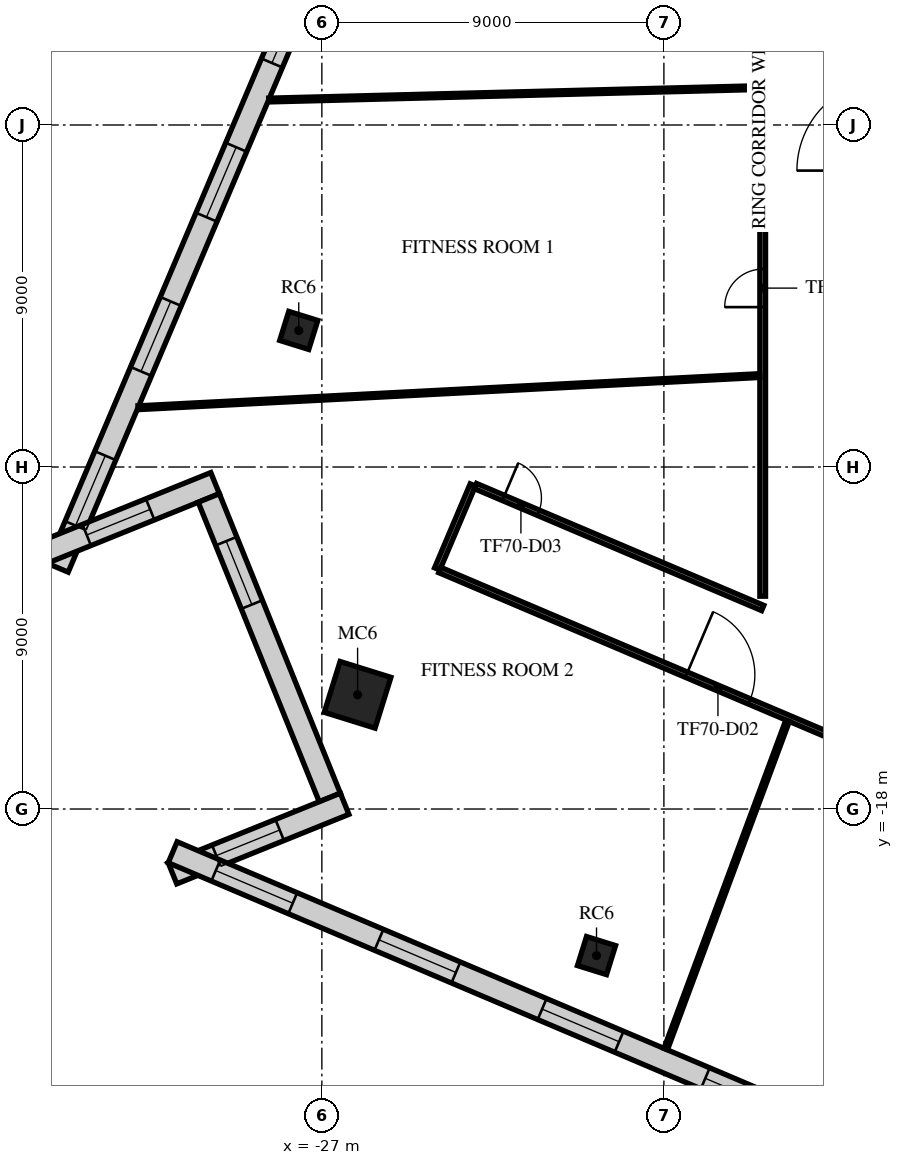
"""IFC4 building model, lengths in metres.
Left out: names, types, materials, properties, quantities, classifications, styles, units other than length and angle.
Written with IfcOpenShell. Run it as: python <this file> out.ifc"""

import sys

from ifc_helpers import new_model, si_unit, direction, frame, frame_2d, origin, origin_2d, place, context, subcontext, project, spatial, rectangle, extrude, element, fill, save


model = new_model("IFC4")
c1 = context("Model", 3, precision=1e-05, world=origin(), true_north=direction((0.0, 1.0)))
c2 = subcontext(c1, "Body", "Model", "MODEL_VIEW")
j1 = project(units=[si_unit("LENGTHUNIT", "METRE"), si_unit("PLANEANGLEUNIT", "RADIAN")], contexts=[c1])
p1 = place(None, origin())
s1 = spatial("IfcSite", under=j1, at=p1, CompositionType="ELEMENT")
p2 = place(p1, origin())
s2 = spatial("IfcBuilding", under=s1, at=p2, CompositionType="ELEMENT")
p3 = place(p2, frame((0.0, 0.0, 296.5)))
s3 = spatial("IfcBuildingStorey", under=s2, at=p3, CompositionType="ELEMENT", Elevation=296.5)
p4 = place(p3, frame((-27.608, -5.406, -0.35), z_axis=(0.0, 0.0, 1.0), x_axis=(0.297503182032, 0.954720826567, 0.0)))
e1 = element("IfcColumn", 1, at=p4, inside=s3, PredefinedType="COLUMN", context=c2, shape_type="SweptSolid", body=[
    extrude(rectangle(XDim=0.8, YDim=0.8, at=origin_2d()), origin(), (0.0, 0.0, 1.0), 4.35),
])
p5 = place(p3, frame((-26.06, -14.995, -0.35), z_axis=(0.0, 0.0, 1.0), x_axis=(0.297503182032, 0.954720826567, 0.0)))
e2 = element("IfcColumn", 2, at=p5, inside=s3, PredefinedType="COLUMN", context=c2, shape_type="SweptSolid", body=[
    extrude(rectangle(XDim=1.4, YDim=1.4, at=origin_2d()), origin(), (0.0, 0.0, 1.0), 4.35),
])
p6 = place(p3, frame((-19.773, -21.857, -0.35), z_axis=(0.0, 0.0, 1.0), x_axis=(0.297503182032, 0.954720826567, 0.0)))
e3 = element("IfcColumn", 3, at=p6, inside=s3, PredefinedType="COLUMN", context=c2, shape_type="SweptSolid", body=[
    extrude(rectangle(XDim=0.8, YDim=0.8, at=origin_2d()), origin(), (0.0, 0.0, 1.0), 4.35),
])
p7 = place(p3, frame((-15.005, 32.985, 0.0), z_axis=(0.0, 0.0, 1.0), x_axis=(-0.39073034436, -0.920505186295, 0.0)))
e4 = element("IfcWall", 4, at=p7, inside=s3, PredefinedType="STANDARD", context=c2, shape_type="SweptSolid", body=[
    extrude(rectangle(XDim=48.49, YDim=0.6, at=frame_2d((24.245, 0.0))), origin(), (0.0, 0.0, 1.0), 3.65),
])
p8 = place(p7, frame((1.204, 0.0, 0.9)))
e5 = element("IfcOpeningElement", 5, at=p8, cuts=e4, PredefinedType="OPENING", context=c2, shape_type="SweptSolid", body=[
    extrude(rectangle(XDim=2.0, YDim=2.1, at=frame_2d((1.0, 1.05))), frame((0.0, 0.31, 0.0), z_axis=(0.0, -1.0, 0.0), x_axis=(1.0, 0.0, 0.0)), (0.0, 0.0, 1.0), 0.62),
])
p9 = place(p7, frame((5.612, 0.0, 0.9)))
e6 = element("IfcOpeningElement", 6, at=p9, cuts=e4, PredefinedType="OPENING", context=c2, shape_type="SweptSolid", body=[
    extrude(rectangle(XDim=2.0, YDim=2.1, at=frame_2d((1.0, 1.05))), frame((0.0, 0.31, 0.0), z_axis=(0.0, -1.0, 0.0), x_axis=(1.0, 0.0, 0.0)), (0.0, 0.0, 1.0), 0.62),
])
p10 = place(p7, frame((10.021, 0.0, 0.9)))
e7 = element("IfcOpeningElement", 7, at=p10, cuts=e4, PredefinedType="OPENING", context=c2, shape_type="SweptSolid", body=[
    extrude(rectangle(XDim=2.0, YDim=2.1, at=frame_2d((1.0, 1.05))), frame((0.0, 0.31, 0.0), z_axis=(0.0, -1.0, 0.0), x_axis=(1.0, 0.0, 0.0)), (0.0, 0.0, 1.0), 0.62),
])
p11 = place(p7, frame((14.428, 0.0, 0.9)))
e8 = element("IfcOpeningElement", 8, at=p11, cuts=e4, PredefinedType="OPENING", context=c2, shape_type="SweptSolid", body=[
    extrude(rectangle(XDim=2.0, YDim=2.1, at=frame_2d((1.0, 1.05))), frame((0.0, 0.31, 0.0), z_axis=(0.0, -1.0, 0.0), x_axis=(1.0, 0.0, 0.0)), (0.0, 0.0, 1.0), 0.62),
])
p12 = place(p7, frame((18.837, 0.0, 0.9)))
e9 = element("IfcOpeningElement", 9, at=p12, cuts=e4, PredefinedType="OPENING", context=c2, shape_type="SweptSolid", body=[
    extrude(rectangle(XDim=2.0, YDim=2.1, at=frame_2d((1.0, 1.05))), frame((0.0, 0.31, 0.0), z_axis=(0.0, -1.0, 0.0), x_axis=(1.0, 0.0, 0.0)), (0.0, 0.0, 1.0), 0.62),
])
p13 = place(p7, frame((23.245, 0.0, 0.9)))
e10 = element("IfcOpeningElement", 10, at=p13, cuts=e4, PredefinedType="OPENING", context=c2, shape_type="SweptSolid", body=[
    extrude(rectangle(XDim=2.0, YDim=2.1, at=frame_2d((1.0, 1.05))), frame((0.0, 0.31, 0.0), z_axis=(0.0, -1.0, 0.0), x_axis=(1.0, 0.0, 0.0)), (0.0, 0.0, 1.0), 0.62),
])
p14 = place(p7, frame((27.653, 0.0, 0.9)))
e11 = element("IfcOpeningElement", 11, at=p14, cuts=e4, PredefinedType="OPENING", context=c2, shape_type="SweptSolid", body=[
    extrude(rectangle(XDim=2.0, YDim=2.1, at=frame_2d((1.0, 1.05))), frame((0.0, 0.31, 0.0), z_axis=(0.0, -1.0, 0.0), x_axis=(1.0, 0.0, 0.0)), (0.0, 0.0, 1.0), 0.62),
])
p15 = place(p7, frame((32.061, 0.0, 0.9)))
e12 = element("IfcOpeningElement", 12, at=p15, cuts=e4, PredefinedType="OPENING", context=c2, shape_type="SweptSolid", body=[
    extrude(rectangle(XDim=2.0, YDim=2.1, at=frame_2d((1.0, 1.05))), frame((0.0, 0.31, 0.0), z_axis=(0.0, -1.0, 0.0), x_axis=(1.0, 0.0, 0.0)), (0.0, 0.0, 1.0), 0.62),
])
p16 = place(p7, frame((36.469, 0.0, 0.9)))
e13 = element("IfcOpeningElement", 13, at=p16, cuts=e4, PredefinedType="OPENING", context=c2, shape_type="SweptSolid", body=[
    extrude(rectangle(XDim=2.0, YDim=2.1, at=frame_2d((1.0, 1.05))), frame((0.0, 0.31, 0.0), z_axis=(0.0, -1.0, 0.0), x_axis=(1.0, 0.0, 0.0)), (0.0, 0.0, 1.0), 0.62),
])
p17 = place(p7, frame((40.877, 0.0, 0.9)))
e14 = element("IfcOpeningElement", 14, at=p17, cuts=e4, PredefinedType="OPENING", context=c2, shape_type="SweptSolid", body=[
    extrude(rectangle(XDim=2.0, YDim=2.1, at=frame_2d((1.0, 1.05))), frame((0.0, 0.31, 0.0), z_axis=(0.0, -1.0, 0.0), x_axis=(1.0, 0.0, 0.0)), (0.0, 0.0, 1.0), 0.62),
])
p18 = place(p7, frame((45.285, 0.0, 0.9)))
e15 = element("IfcOpeningElement", 15, at=p18, cuts=e4, PredefinedType="OPENING", context=c2, shape_type="SweptSolid", body=[
    extrude(rectangle(XDim=2.0, YDim=2.1, at=frame_2d((1.0, 1.05))), frame((0.0, 0.31, 0.0), z_axis=(0.0, -1.0, 0.0), x_axis=(1.0, 0.0, 0.0)), (0.0, 0.0, 1.0), 0.62),
])
p19 = place(p3, frame((-34.34, -11.255, 0.0), z_axis=(0.0, 0.0, 1.0), x_axis=(0.927189106571, 0.374593593988, 0.0)))
e16 = element("IfcWall", 16, at=p19, inside=s3, PredefinedType="STANDARD", context=c2, shape_type="SweptSolid", body=[
    extrude(rectangle(XDim=4.885, YDim=0.6, at=frame_2d((2.443, 0.0))), origin(), (0.0, 0.0, 1.0), 3.65),
])
p20 = place(p19, frame((1.243, 0.0, 0.9)))
e17 = element("IfcOpeningElement", 17, at=p20, cuts=e16, PredefinedType="OPENING", context=c2, shape_type="SweptSolid", body=[
    extrude(rectangle(XDim=1.8, YDim=2.1, at=frame_2d((0.9, 1.05))), frame((0.0, 0.31, 0.0), z_axis=(0.0, -1.0, 0.0), x_axis=(1.0, 0.0, 0.0)), (0.0, 0.0, 1.0), 0.62),
])
p21 = place(p3, frame((-29.976, -9.815, 0.0), z_axis=(0.0, 0.0, 1.0), x_axis=(0.374622134294, -0.927177575493, 0.0)))
e18 = element("IfcWall", 18, at=p21, inside=s3, PredefinedType="STANDARD", context=c2, shape_type="SweptSolid", body=[
    extrude(rectangle(XDim=8.5, YDim=0.6, at=frame_2d((4.25, 0.0))), origin(), (0.0, 0.0, 1.0), 3.65),
])
p22 = place(p21, frame((1.225, 0.0, 0.9)))
e19 = element("IfcOpeningElement", 19, at=p22, cuts=e18, PredefinedType="OPENING", context=c2, shape_type="SweptSolid", body=[
    extrude(rectangle(XDim=1.8, YDim=2.1, at=frame_2d((0.9, 1.05))), frame((0.0, 0.31, 0.0), z_axis=(0.0, -1.0, 0.0), x_axis=(1.0, 0.0, 0.0)), (0.0, 0.0, 1.0), 0.62),
])
p23 = place(p3, frame((-26.401, -17.862, 0.0), z_axis=(0.0, 0.0, 1.0), x_axis=(-0.927189106571, -0.374593593988, 0.0)))
e20 = element("IfcWall", 20, at=p23, inside=s3, PredefinedType="STANDARD", context=c2, shape_type="SweptSolid", body=[
    extrude(rectangle(XDim=4.885, YDim=0.6, at=frame_2d((2.443, 0.0))), origin(), (0.0, 0.0, 1.0), 3.65),
])
p24 = place(p23, frame((1.843, 0.0, 0.9)))
e21 = element("IfcOpeningElement", 21, at=p24, cuts=e20, PredefinedType="OPENING", context=c2, shape_type="SweptSolid", body=[
    extrude(rectangle(XDim=1.8, YDim=2.1, at=frame_2d((0.9, 1.05))), frame((0.0, 0.31, 0.0), z_axis=(0.0, -1.0, 0.0), x_axis=(1.0, 0.0, 0.0)), (0.0, 0.0, 1.0), 0.62),
])
p25 = place(p3, frame((-30.926, -19.138, 0.0), z_axis=(0.0, 0.0, 1.0), x_axis=(0.920504905663, -0.39073100549, 0.0)))
e22 = element("IfcWall", 22, at=p25, inside=s3, PredefinedType="STANDARD", context=c2, shape_type="SweptSolid", body=[
    extrude(rectangle(XDim=41.979, YDim=0.6, at=frame_2d((20.99, 0.0))), origin(), (0.0, 0.0, 1.0), 3.65),
])
p26 = place(p25, frame((1.232, 0.0, 0.9)))
e23 = element("IfcOpeningElement", 23, at=p26, cuts=e22, PredefinedType="OPENING", context=c2, shape_type="SweptSolid", body=[
    extrude(rectangle(XDim=2.2, YDim=2.1, at=frame_2d((1.1, 1.05))), frame((0.0, 0.31, 0.0), z_axis=(0.0, -1.0, 0.0), x_axis=(1.0, 0.0, 0.0)), (0.0, 0.0, 1.0), 0.62),
])
p27 = place(p25, frame((5.896, 0.0, 0.9)))
e24 = element("IfcOpeningElement", 24, at=p27, cuts=e22, PredefinedType="OPENING", context=c2, shape_type="SweptSolid", body=[
    extrude(rectangle(XDim=2.2, YDim=2.1, at=frame_2d((1.1, 1.05))), frame((0.0, 0.31, 0.0), z_axis=(0.0, -1.0, 0.0), x_axis=(1.0, 0.0, 0.0)), (0.0, 0.0, 1.0), 0.62),
])
p28 = place(p25, frame((10.561, 0.0, 0.9)))
e25 = element("IfcOpeningElement", 25, at=p28, cuts=e22, PredefinedType="OPENING", context=c2, shape_type="SweptSolid", body=[
    extrude(rectangle(XDim=2.2, YDim=2.1, at=frame_2d((1.1, 1.05))), frame((0.0, 0.31, 0.0), z_axis=(0.0, -1.0, 0.0), x_axis=(1.0, 0.0, 0.0)), (0.0, 0.0, 1.0), 0.62),
])
p29 = place(p25, frame((15.225, 0.0, 0.9)))
e26 = element("IfcOpeningElement", 26, at=p29, cuts=e22, PredefinedType="OPENING", context=c2, shape_type="SweptSolid", body=[
    extrude(rectangle(XDim=2.2, YDim=2.1, at=frame_2d((1.1, 1.05))), frame((0.0, 0.31, 0.0), z_axis=(0.0, -1.0, 0.0), x_axis=(1.0, 0.0, 0.0)), (0.0, 0.0, 1.0), 0.62),
])
p30 = place(p25, frame((19.89, 0.0, 0.9)))
e27 = element("IfcOpeningElement", 27, at=p30, cuts=e22, PredefinedType="OPENING", context=c2, shape_type="SweptSolid", body=[
    extrude(rectangle(XDim=2.2, YDim=2.1, at=frame_2d((1.1, 1.05))), frame((0.0, 0.31, 0.0), z_axis=(0.0, -1.0, 0.0), x_axis=(1.0, 0.0, 0.0)), (0.0, 0.0, 1.0), 0.62),
])
p31 = place(p25, frame((24.554, 0.0, 0.9)))
e28 = element("IfcOpeningElement", 28, at=p31, cuts=e22, PredefinedType="OPENING", context=c2, shape_type="SweptSolid", body=[
    extrude(rectangle(XDim=2.2, YDim=2.1, at=frame_2d((1.1, 1.05))), frame((0.0, 0.31, 0.0), z_axis=(0.0, -1.0, 0.0), x_axis=(1.0, 0.0, 0.0)), (0.0, 0.0, 1.0), 0.62),
])
p32 = place(p25, frame((29.218, 0.0, 0.9)))
e29 = element("IfcOpeningElement", 29, at=p32, cuts=e22, PredefinedType="OPENING", context=c2, shape_type="SweptSolid", body=[
    extrude(rectangle(XDim=2.2, YDim=2.1, at=frame_2d((1.1, 1.05))), frame((0.0, 0.31, 0.0), z_axis=(0.0, -1.0, 0.0), x_axis=(1.0, 0.0, 0.0)), (0.0, 0.0, 1.0), 0.62),
])
p33 = place(p25, frame((33.883, 0.0, 0.9)))
e30 = element("IfcOpeningElement", 30, at=p33, cuts=e22, PredefinedType="OPENING", context=c2, shape_type="SweptSolid", body=[
    extrude(rectangle(XDim=2.2, YDim=2.1, at=frame_2d((1.1, 1.05))), frame((0.0, 0.31, 0.0), z_axis=(0.0, -1.0, 0.0), x_axis=(1.0, 0.0, 0.0)), (0.0, 0.0, 1.0), 0.62),
])
p34 = place(p25, frame((38.547, 0.0, 0.9)))
e31 = element("IfcOpeningElement", 31, at=p34, cuts=e22, PredefinedType="OPENING", context=c2, shape_type="SweptSolid", body=[
    extrude(rectangle(XDim=2.2, YDim=2.1, at=frame_2d((1.1, 1.05))), frame((0.0, 0.31, 0.0), z_axis=(0.0, -1.0, 0.0), x_axis=(1.0, 0.0, 0.0)), (0.0, 0.0, 1.0), 0.62),
])
p35 = place(p3, frame((-23.965, -11.682, 0.0), z_axis=(0.0, 0.0, 1.0), x_axis=(0.390356552854, 0.920663761448, 0.0)))
e32 = element("IfcWall", 32, at=p35, inside=s3, PredefinedType="PARTITIONING", context=c2, shape_type="SweptSolid", body=[
    extrude(rectangle(XDim=2.4, YDim=0.15, at=frame_2d((1.2, 0.0))), origin(), (0.0, 0.0, 1.0), 3.25),
])
p36 = place(p3, frame((-23.896, -11.711, 0.0), z_axis=(0.0, 0.0, 1.0), x_axis=(0.920507643781, -0.390724554821, 0.0)))
e33 = element("IfcWall", 33, at=p36, inside=s3, PredefinedType="PARTITIONING", context=c2, shape_type="SweptSolid", body=[
    extrude(rectangle(XDim=34.917, YDim=0.15, at=frame_2d((17.458, 0.0))), origin(), (0.0, 0.0, 1.0), 3.25),
])
p37 = place(p36, frame((7.05, 0.0, 0.0)))
e34 = element("IfcOpeningElement", 34, at=p37, cuts=e33, PredefinedType="OPENING", context=c2, shape_type="SweptSolid", body=[
    extrude(rectangle(XDim=1.8, YDim=2.1, at=frame_2d((0.9, 1.05))), frame((0.0, 0.085, 0.0), z_axis=(0.0, -1.0, 0.0), x_axis=(1.0, 0.0, 0.0)), (0.0, 0.0, 1.0), 0.17),
])
p38 = place(p36, frame((14.27, 0.0, 0.0)))
e35 = element("IfcOpeningElement", 35, at=p38, cuts=e33, PredefinedType="OPENING", context=c2, shape_type="SweptSolid", body=[
    extrude(rectangle(XDim=1.0, YDim=2.1, at=frame_2d((0.5, 1.05))), frame((0.0, 0.085, 0.0), z_axis=(0.0, -1.0, 0.0), x_axis=(1.0, 0.0, 0.0)), (0.0, 0.0, 1.0), 0.17),
])
p39 = place(p36, frame((29.011, 0.0, 0.0)))
e36 = element("IfcOpeningElement", 36, at=p39, cuts=e33, PredefinedType="OPENING", context=c2, shape_type="SweptSolid", body=[
    extrude(rectangle(XDim=1.0, YDim=2.1, at=frame_2d((0.5, 1.05))), frame((0.0, 0.085, 0.0), z_axis=(0.0, -1.0, 0.0), x_axis=(1.0, 0.0, 0.0)), (0.0, 0.0, 1.0), 0.17),
])
p40 = place(p3, frame((-22.959, -9.501, 0.0), z_axis=(0.0, 0.0, 1.0), x_axis=(0.920500461351, -0.390741475471, 0.0)))
e37 = element("IfcWall", 37, at=p40, inside=s3, PredefinedType="PARTITIONING", context=c2, shape_type="SweptSolid", body=[
    extrude(rectangle(XDim=8.212, YDim=0.15, at=frame_2d((4.106, 0.0))), origin(), (0.0, 0.0, 1.0), 3.25),
])
p41 = place(p40, frame((0.8, 0.0, 0.0)))
e38 = element("IfcOpeningElement", 38, at=p41, cuts=e37, PredefinedType="OPENING", context=c2, shape_type="SweptSolid", body=[
    extrude(rectangle(XDim=1.0, YDim=2.1, at=frame_2d((0.5, 1.05))), frame((0.0, 0.085, 0.0), z_axis=(0.0, -1.0, 0.0), x_axis=(1.0, 0.0, 0.0)), (0.0, 0.0, 1.0), 0.17),
])
p42 = place(p3, frame((-15.4, -12.4, 0.0), z_axis=(0.0, 0.0, 1.0), x_axis=(0.0, 1.0, 0.0)))
e39 = element("IfcWall", 39, at=p42, inside=s3, PredefinedType="PARTITIONING", context=c2, shape_type="SweptSolid", body=[
    extrude(rectangle(XDim=27.8, YDim=0.15, at=frame_2d((13.9, 0.0))), origin(), (0.0, 0.0, 1.0), 3.25),
])
p43 = place(p42, frame((7.608, 0.0, 0.0)))
e40 = element("IfcOpeningElement", 40, at=p43, cuts=e39, PredefinedType="OPENING", context=c2, shape_type="SweptSolid", body=[
    extrude(rectangle(XDim=1.0, YDim=2.1, at=frame_2d((0.5, 1.05))), frame((0.0, 0.085, 0.0), z_axis=(0.0, -1.0, 0.0), x_axis=(1.0, 0.0, 0.0)), (0.0, 0.0, 1.0), 0.17),
])
p44 = place(p42, frame((16.435, 0.0, 0.0)))
e41 = element("IfcOpeningElement", 41, at=p44, cuts=e39, PredefinedType="OPENING", context=c2, shape_type="SweptSolid", body=[
    extrude(rectangle(XDim=1.0, YDim=2.1, at=frame_2d((0.5, 1.05))), frame((0.0, 0.085, 0.0), z_axis=(0.0, -1.0, 0.0), x_axis=(1.0, 0.0, 0.0)), (0.0, 0.0, 1.0), 0.17),
])
p45 = place(p3, frame((-31.836, -7.44, 0.0), z_axis=(0.0, 0.0, 1.0), x_axis=(0.998664003793, 0.05167405082, 0.0)))
e42 = element("IfcWall", 42, at=p45, inside=s3, PredefinedType="PARTITIONING", context=c2, shape_type="SweptSolid", body=[
    extrude(rectangle(XDim=16.38, YDim=0.1, at=frame_2d((8.19, 0.0))), origin(), (0.0, 0.0, 1.0), 3.65),
])
p46 = place(p3, frame((-28.399, 0.657, 0.0), z_axis=(0.0, 0.0, 1.0), x_axis=(0.999679226592, 0.025326743172, 0.0)))
e43 = element("IfcWall", 43, at=p46, inside=s3, PredefinedType="PARTITIONING", context=c2, shape_type="SweptSolid", body=[
    extrude(rectangle(XDim=12.927, YDim=0.1, at=frame_2d((6.463, 0.0))), origin(), (0.0, 0.0, 1.0), 3.25),
])
p47 = place(p3, frame((-17.952, -24.317, 0.0), z_axis=(0.0, 0.0, 1.0), x_axis=(0.348014202779, 0.937489261093, 0.0)))
e44 = element("IfcWall", 44, at=p47, inside=s3, PredefinedType="PARTITIONING", context=c2, shape_type="SweptSolid", body=[
    extrude(rectangle(XDim=9.213, YDim=0.1, at=frame_2d((4.606, 0.0))), origin(), (0.0, 0.0, 1.0), 3.25),
])
p48 = place(p15, origin())
e45 = element("IfcWindow", 45, at=p48, inside=s3, PartitioningType="SINGLE_PANEL", PredefinedType="WINDOW", context=c2, shape_type="SweptSolid", body=[
    extrude(rectangle(XDim=2.0, YDim=2.1, at=frame_2d((1.0, 1.05))), frame((0.0, 0.03, 0.0), z_axis=(0.0, -1.0, 0.0), x_axis=(1.0, 0.0, 0.0)), (0.0, 0.0, 1.0), 0.06),
])
fill(e12, e45)
p49 = place(p16, origin())
e46 = element("IfcWindow", 46, at=p49, inside=s3, PartitioningType="SINGLE_PANEL", PredefinedType="WINDOW", context=c2, shape_type="SweptSolid", body=[
    extrude(rectangle(XDim=2.0, YDim=2.1, at=frame_2d((1.0, 1.05))), frame((0.0, 0.03, 0.0), z_axis=(0.0, -1.0, 0.0), x_axis=(1.0, 0.0, 0.0)), (0.0, 0.0, 1.0), 0.06),
])
fill(e13, e46)
p50 = place(p17, origin())
e47 = element("IfcWindow", 47, at=p50, inside=s3, PartitioningType="SINGLE_PANEL", PredefinedType="WINDOW", context=c2, shape_type="SweptSolid", body=[
    extrude(rectangle(XDim=2.0, YDim=2.1, at=frame_2d((1.0, 1.05))), frame((0.0, 0.03, 0.0), z_axis=(0.0, -1.0, 0.0), x_axis=(1.0, 0.0, 0.0)), (0.0, 0.0, 1.0), 0.06),
])
fill(e14, e47)
p51 = place(p18, origin())
e48 = element("IfcWindow", 48, at=p51, inside=s3, PartitioningType="SINGLE_PANEL", PredefinedType="WINDOW", context=c2, shape_type="SweptSolid", body=[
    extrude(rectangle(XDim=2.0, YDim=2.1, at=frame_2d((1.0, 1.05))), frame((0.0, 0.03, 0.0), z_axis=(0.0, -1.0, 0.0), x_axis=(1.0, 0.0, 0.0)), (0.0, 0.0, 1.0), 0.06),
])
fill(e15, e48)
p52 = place(p20, origin())
e49 = element("IfcWindow", 49, at=p52, inside=s3, PartitioningType="SINGLE_PANEL", PredefinedType="WINDOW", context=c2, shape_type="SweptSolid", body=[
    extrude(rectangle(XDim=1.8, YDim=2.1, at=frame_2d((0.9, 1.05))), frame((0.0, 0.03, 0.0), z_axis=(0.0, -1.0, 0.0), x_axis=(1.0, 0.0, 0.0)), (0.0, 0.0, 1.0), 0.06),
])
fill(e17, e49)
p53 = place(p22, origin())
e50 = element("IfcWindow", 50, at=p53, inside=s3, PartitioningType="SINGLE_PANEL", PredefinedType="WINDOW", context=c2, shape_type="SweptSolid", body=[
    extrude(rectangle(XDim=1.8, YDim=2.1, at=frame_2d((0.9, 1.05))), frame((0.0, 0.03, 0.0), z_axis=(0.0, -1.0, 0.0), x_axis=(1.0, 0.0, 0.0)), (0.0, 0.0, 1.0), 0.06),
])
fill(e19, e50)
p54 = place(p24, origin())
e51 = element("IfcWindow", 51, at=p54, inside=s3, PartitioningType="SINGLE_PANEL", PredefinedType="WINDOW", context=c2, shape_type="SweptSolid", body=[
    extrude(rectangle(XDim=1.8, YDim=2.1, at=frame_2d((0.9, 1.05))), frame((0.0, 0.03, 0.0), z_axis=(0.0, -1.0, 0.0), x_axis=(1.0, 0.0, 0.0)), (0.0, 0.0, 1.0), 0.06),
])
fill(e21, e51)
p55 = place(p26, origin())
e52 = element("IfcWindow", 52, at=p55, inside=s3, PartitioningType="SINGLE_PANEL", PredefinedType="WINDOW", context=c2, shape_type="SweptSolid", body=[
    extrude(rectangle(XDim=2.2, YDim=2.1, at=frame_2d((1.1, 1.05))), frame((0.0, 0.03, 0.0), z_axis=(0.0, -1.0, 0.0), x_axis=(1.0, 0.0, 0.0)), (0.0, 0.0, 1.0), 0.06),
])
fill(e23, e52)
p56 = place(p27, origin())
e53 = element("IfcWindow", 53, at=p56, inside=s3, PartitioningType="SINGLE_PANEL", PredefinedType="WINDOW", context=c2, shape_type="SweptSolid", body=[
    extrude(rectangle(XDim=2.2, YDim=2.1, at=frame_2d((1.1, 1.05))), frame((0.0, 0.03, 0.0), z_axis=(0.0, -1.0, 0.0), x_axis=(1.0, 0.0, 0.0)), (0.0, 0.0, 1.0), 0.06),
])
fill(e24, e53)
p57 = place(p28, origin())
e54 = element("IfcWindow", 54, at=p57, inside=s3, PartitioningType="SINGLE_PANEL", PredefinedType="WINDOW", context=c2, shape_type="SweptSolid", body=[
    extrude(rectangle(XDim=2.2, YDim=2.1, at=frame_2d((1.1, 1.05))), frame((0.0, 0.03, 0.0), z_axis=(0.0, -1.0, 0.0), x_axis=(1.0, 0.0, 0.0)), (0.0, 0.0, 1.0), 0.06),
])
fill(e25, e54)
p58 = place(p29, origin())
e55 = element("IfcWindow", 55, at=p58, inside=s3, PartitioningType="SINGLE_PANEL", PredefinedType="WINDOW", context=c2, shape_type="SweptSolid", body=[
    extrude(rectangle(XDim=2.2, YDim=2.1, at=frame_2d((1.1, 1.05))), frame((0.0, 0.03, 0.0), z_axis=(0.0, -1.0, 0.0), x_axis=(1.0, 0.0, 0.0)), (0.0, 0.0, 1.0), 0.06),
])
fill(e26, e55)
p59 = place(p43, origin())
e56 = element("IfcDoor", 56, at=p59, inside=s3, OperationType="SINGLE_SWING_RIGHT", PredefinedType="DOOR", context=c2, shape_type="SweptSolid", body=[
    extrude(rectangle(XDim=1.0, YDim=2.1, at=frame_2d((0.5, 1.05))), frame((0.0, 0.025, 0.0), z_axis=(0.0, -1.0, 0.0), x_axis=(1.0, 0.0, 0.0)), (0.0, 0.0, 1.0), 0.05),
])
fill(e40, e56)
p60 = place(p37, frame((1.8, 0.0, 0.0), z_axis=(0.0, 0.0, 1.0), x_axis=(-1.0, 0.0, 0.0)))
e57 = element("IfcDoor", 57, at=p60, inside=s3, OperationType="DOUBLE_DOOR_SINGLE_SWING", PredefinedType="DOOR", context=c2, shape_type="SweptSolid", body=[
    extrude(rectangle(XDim=1.8, YDim=2.1, at=frame_2d((0.9, 1.05))), frame((0.0, 0.025, 0.0), z_axis=(0.0, -1.0, 0.0), x_axis=(1.0, 0.0, 0.0)), (0.0, 0.0, 1.0), 0.05),
])
fill(e34, e57)
p61 = place(p41, origin())
e58 = element("IfcDoor", 58, at=p61, inside=s3, OperationType="SINGLE_SWING_RIGHT", PredefinedType="DOOR", context=c2, shape_type="SweptSolid", body=[
    extrude(rectangle(XDim=1.0, YDim=2.1, at=frame_2d((0.5, 1.05))), frame((0.0, 0.025, 0.0), z_axis=(0.0, -1.0, 0.0), x_axis=(1.0, 0.0, 0.0)), (0.0, 0.0, 1.0), 0.05),
])
fill(e38, e58)
save(model, sys.argv[1])
